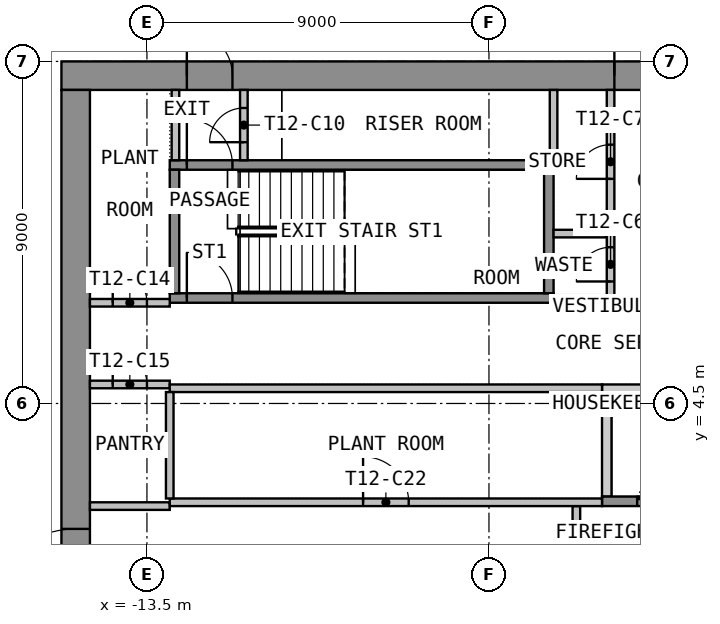
"""IFC4 building model, lengths in metres.
Left out: names, types, materials, properties, quantities, classifications, styles, units other than length and angle.
Written with IfcOpenShell. Run it as: python <this file> out.ifc"""

import sys

from ifc_helpers import new_model, si_unit, direction, frame, frame_2d, origin, place, context, subcontext, project, spatial, polyline, rectangle, outline, extrude, element, fill, save


model = new_model("IFC4")
c1 = context("Model", 3, precision=1e-05, world=origin(), true_north=direction((0.0, 1.0)))
c2 = subcontext(c1, "Body", "Model", "MODEL_VIEW")
j1 = project(units=[si_unit("LENGTHUNIT", "METRE"), si_unit("PLANEANGLEUNIT", "RADIAN")], contexts=[c1])
p1 = place(None, origin())
s1 = spatial("IfcSite", under=j1, at=p1, CompositionType="ELEMENT")
p2 = place(p1, origin())
s2 = spatial("IfcBuilding", under=s1, at=p2, CompositionType="ELEMENT")
p3 = place(p2, frame((0.0, 0.0, 167.7)))
s3 = spatial("IfcBuildingStorey", under=s2, at=p3, CompositionType="ELEMENT", Elevation=167.7)
p4 = place(p3, frame((-15.75, 13.125, 0.0), z_axis=(0.0, 0.0, 1.0), x_axis=(1.0, 0.0, 0.0)))
e1 = element("IfcWall", 1, at=p4, inside=s3, PredefinedType="SHEAR", context=c2, shape_type="SweptSolid", body=[
    extrude(rectangle(XDim=31.5, YDim=0.75, at=frame_2d((15.75, 0.0))), origin(), (0.0, 0.0, 1.0), 3.575),
])
p5 = place(p4, frame((14.55, 0.0, 0.0)))
e2 = element("IfcOpeningElement", 2, at=p5, cuts=e1, PredefinedType="OPENING", context=c2, shape_type="SweptSolid", body=[
    extrude(rectangle(XDim=2.4, YDim=2.1, at=frame_2d((1.2, 1.05))), frame((0.0, 0.385, 0.0), z_axis=(0.0, -1.0, 0.0), x_axis=(1.0, 0.0, 0.0)), (0.0, 0.0, 1.0), 0.77),
])
p6 = place(p4, frame((3.3, 0.0, 0.0)))
e3 = element("IfcOpeningElement", 3, at=p6, cuts=e1, PredefinedType="OPENING", context=c2, shape_type="SweptSolid", body=[
    extrude(rectangle(XDim=1.2, YDim=2.1, at=frame_2d((0.6, 1.05))), frame((0.0, 0.385, 0.0), z_axis=(0.0, -1.0, 0.0), x_axis=(1.0, 0.0, 0.0)), (0.0, 0.0, 1.0), 0.77),
])
p7 = place(p4, frame((27.0, 0.0, 0.0)))
e4 = element("IfcOpeningElement", 4, at=p7, cuts=e1, PredefinedType="OPENING", context=c2, shape_type="SweptSolid", body=[
    extrude(rectangle(XDim=1.2, YDim=2.1, at=frame_2d((0.6, 1.05))), frame((0.0, 0.385, 0.0), z_axis=(0.0, -1.0, 0.0), x_axis=(1.0, 0.0, 0.0)), (0.0, 0.0, 1.0), 0.77),
])
p8 = place(p3, frame((-15.375, -12.75, 0.0), z_axis=(0.0, 0.0, 1.0), x_axis=(0.0, 1.0, 0.0)))
e5 = element("IfcWall", 5, at=p8, inside=s3, PredefinedType="SHEAR", context=c2, shape_type="SweptSolid", body=[
    extrude(rectangle(XDim=25.5, YDim=0.75, at=frame_2d((12.75, 0.0))), origin(), (0.0, 0.0, 1.0), 3.575),
])
p9 = place(p8, frame((11.55, 0.0, 0.0)))
e6 = element("IfcOpeningElement", 6, at=p9, cuts=e5, PredefinedType="OPENING", context=c2, shape_type="SweptSolid", body=[
    extrude(rectangle(XDim=2.4, YDim=2.1, at=frame_2d((1.2, 1.05))), frame((0.0, 0.385, 0.0), z_axis=(0.0, -1.0, 0.0), x_axis=(1.0, 0.0, 0.0)), (0.0, 0.0, 1.0), 0.77),
])
p10 = place(p3, origin())
e7 = element("IfcWall", 7, at=p10, inside=s3, PredefinedType="SHEAR", context=c2, shape_type="SweptSolid", body=[
    extrude(outline(polyline([(-1.525, 4.75), (1.525, 4.75), (1.525, 5.0), (-1.525, 5.0), (-1.525, 4.75)])), origin(), (0.0, 0.0, 1.0), 3.575),
])
p11 = place(p3, origin())
e8 = element("IfcWall", 8, at=p11, inside=s3, PredefinedType="SHEAR", context=c2, shape_type="SweptSolid", body=[
    extrude(outline(polyline([(-1.525, 2.05), (-1.275, 2.05), (-1.275, 4.75), (-1.525, 4.75), (-1.525, 2.05)])), origin(), (0.0, 0.0, 1.0), 3.575),
])
p12 = place(p3, frame((-1.525, 1.925, 0.0), z_axis=(0.0, 0.0, 1.0), x_axis=(1.0, 0.0, 0.0)))
e9 = element("IfcWall", 9, at=p12, inside=s3, PredefinedType="SHEAR", context=c2, shape_type="SweptSolid", body=[
    extrude(rectangle(XDim=3.05, YDim=0.25, at=frame_2d((1.525, 0.0))), origin(), (0.0, 0.0, 1.0), 3.575),
])
p13 = place(p12, frame((0.925, 0.0, 0.0)))
e10 = element("IfcOpeningElement", 10, at=p13, cuts=e9, PredefinedType="OPENING", context=c2, shape_type="SweptSolid", body=[
    extrude(rectangle(XDim=1.2, YDim=2.1, at=frame_2d((0.6, 1.05))), frame((0.0, 0.135, 0.0), z_axis=(0.0, -1.0, 0.0), x_axis=(1.0, 0.0, 0.0)), (0.0, 0.0, 1.0), 0.27),
])
p14 = place(p3, frame((-2.2, -1.8, 0.0), z_axis=(0.0, 0.0, 1.0), x_axis=(0.0, 1.0, 0.0)))
e11 = element("IfcWall", 11, at=p14, inside=s3, PredefinedType="PARTITIONING", context=c2, shape_type="SweptSolid", body=[
    extrude(rectangle(XDim=3.6, YDim=0.2, at=frame_2d((1.8, 0.0))), origin(), (0.0, 0.0, 1.0), 3.575),
])
p15 = place(p14, frame((1.2, 0.0, 0.0)))
e12 = element("IfcOpeningElement", 12, at=p15, cuts=e11, PredefinedType="OPENING", context=c2, shape_type="SweptSolid", body=[
    extrude(rectangle(XDim=1.2, YDim=2.1, at=frame_2d((0.6, 1.05))), frame((0.0, 0.11, 0.0), z_axis=(0.0, -1.0, 0.0), x_axis=(1.0, 0.0, 0.0)), (0.0, 0.0, 1.0), 0.22),
])
p16 = place(p3, frame((-12.9, 7.275, 0.0), z_axis=(0.0, 0.0, 1.0), x_axis=(1.0, 0.0, 0.0)))
e13 = element("IfcWall", 13, at=p16, inside=s3, PredefinedType="SHEAR", context=c2, shape_type="SweptSolid", body=[
    extrude(rectangle(XDim=10.1, YDim=0.25, at=frame_2d((5.05, 0.0))), origin(), (0.0, 0.0, 1.0), 3.575),
])
p17 = place(p16, frame((0.45, 0.0, 0.0)))
e14 = element("IfcOpeningElement", 14, at=p17, cuts=e13, PredefinedType="OPENING", context=c2, shape_type="SweptSolid", body=[
    extrude(rectangle(XDim=1.2, YDim=2.1, at=frame_2d((0.6, 1.05))), frame((0.0, 0.135, 0.0), z_axis=(0.0, -1.0, 0.0), x_axis=(1.0, 0.0, 0.0)), (0.0, 0.0, 1.0), 0.27),
])
p18 = place(p3, frame((-12.9, 10.775, 0.0), z_axis=(0.0, 0.0, 1.0), x_axis=(1.0, 0.0, 0.0)))
e15 = element("IfcWall", 15, at=p18, inside=s3, PredefinedType="SHEAR", context=c2, shape_type="SweptSolid", body=[
    extrude(rectangle(XDim=10.1, YDim=0.25, at=frame_2d((5.05, 0.0))), origin(), (0.0, 0.0, 1.0), 3.575),
])
p19 = place(p18, frame((0.45, 0.0, 0.0)))
e16 = element("IfcOpeningElement", 16, at=p19, cuts=e15, PredefinedType="OPENING", context=c2, shape_type="SweptSolid", body=[
    extrude(rectangle(XDim=1.2, YDim=2.1, at=frame_2d((0.6, 1.05))), frame((0.0, 0.135, 0.0), z_axis=(0.0, -1.0, 0.0), x_axis=(1.0, 0.0, 0.0)), (0.0, 0.0, 1.0), 0.27),
])
for number, where, z_axis, x_axis in (
    (17, (-12.775, 7.4, 0.0), (0.0, 0.0, 1.0), (0.0, 1.0, 0.0)),
    (18, (-2.925, 7.4, 0.0), (0.0, 0.0, 1.0), (0.0, 1.0, 0.0)),
):
    element("IfcWall", number, at=place(p3, frame(where, z_axis=z_axis, x_axis=x_axis)), inside=s3, PredefinedType="SHEAR", context=c2, shape_type="SweptSolid", body=[
        extrude(rectangle(XDim=3.25, YDim=0.25, at=frame_2d((1.625, 0.0))), origin(), (0.0, 0.0, 1.0), 3.575),
    ])
for number, where, z_axis, x_axis in (
    (19, (-2.8, 7.25, 0.0), (0.0, 0.0, 1.0), (1.0, 0.0, 0.0)),
    (20, (-2.8, 8.97, 0.0), (0.0, 0.0, 1.0), (1.0, 0.0, 0.0)),
):
    element("IfcWall", number, at=place(p3, frame(where, z_axis=z_axis, x_axis=x_axis)), inside=s3, PredefinedType="PARTITIONING", context=c2, shape_type="SweptSolid", body=[
        extrude(rectangle(XDim=1.4, YDim=0.2, at=frame_2d((0.7, 0.0))), origin(), (0.0, 0.0, 1.0), 3.575),
    ])
p20 = place(p3, frame((-1.3, 7.15, 0.0), z_axis=(0.0, 0.0, 1.0), x_axis=(0.0, 1.0, 0.0)))
e21 = element("IfcWall", 21, at=p20, inside=s3, PredefinedType="PARTITIONING", context=c2, shape_type="SweptSolid", body=[
    extrude(rectangle(XDim=5.6, YDim=0.2, at=frame_2d((2.8, 0.0))), origin(), (0.0, 0.0, 1.0), 3.575),
])
p21 = place(p20, frame((0.56, 0.0, 0.0)))
e22 = element("IfcOpeningElement", 22, at=p21, cuts=e21, PredefinedType="OPENING", context=c2, shape_type="SweptSolid", body=[
    extrude(rectangle(XDim=0.9, YDim=2.1, at=frame_2d((0.45, 1.05))), frame((0.0, 0.11, 0.0), z_axis=(0.0, -1.0, 0.0), x_axis=(1.0, 0.0, 0.0)), (0.0, 0.0, 1.0), 0.22),
])
p22 = place(p20, frame((3.26, 0.0, 0.0)))
e23 = element("IfcOpeningElement", 23, at=p22, cuts=e21, PredefinedType="OPENING", context=c2, shape_type="SweptSolid", body=[
    extrude(rectangle(XDim=0.9, YDim=2.1, at=frame_2d((0.45, 1.05))), frame((0.0, 0.11, 0.0), z_axis=(0.0, -1.0, 0.0), x_axis=(1.0, 0.0, 0.0)), (0.0, 0.0, 1.0), 0.22),
])
p23 = place(p3, frame((-12.75, 10.9, 0.0), z_axis=(0.0, 0.0, 1.0), x_axis=(0.0, 1.0, 0.0)))
e24 = element("IfcWall", 24, at=p23, inside=s3, PredefinedType="PARTITIONING", context=c2, shape_type="SweptSolid", body=[
    extrude(rectangle(XDim=1.85, YDim=0.2, at=frame_2d((0.925, 0.0))), origin(), (0.0, 0.0, 1.0), 3.575),
])
p24 = place(p3, frame((-10.95, 10.9, 0.0), z_axis=(0.0, 0.0, 1.0), x_axis=(0.0, 1.0, 0.0)))
e25 = element("IfcWall", 25, at=p24, inside=s3, PredefinedType="PARTITIONING", context=c2, shape_type="SweptSolid", body=[
    extrude(rectangle(XDim=1.85, YDim=0.2, at=frame_2d((0.925, 0.0))), origin(), (0.0, 0.0, 1.0), 3.575),
])
p25 = place(p24, frame((0.475, 0.0, 0.0)))
e26 = element("IfcOpeningElement", 26, at=p25, cuts=e25, PredefinedType="OPENING", context=c2, shape_type="SweptSolid", body=[
    extrude(rectangle(XDim=0.9, YDim=2.1, at=frame_2d((0.45, 1.05))), frame((0.0, 0.11, 0.0), z_axis=(0.0, -1.0, 0.0), x_axis=(1.0, 0.0, 0.0)), (0.0, 0.0, 1.0), 0.22),
])
p26 = place(p3, frame((-15.0, 7.15, 0.0), z_axis=(0.0, 0.0, 1.0), x_axis=(1.0, 0.0, 0.0)))
e27 = element("IfcWall", 27, at=p26, inside=s3, PredefinedType="PARTITIONING", context=c2, shape_type="SweptSolid", body=[
    extrude(rectangle(XDim=2.1, YDim=0.2, at=frame_2d((1.05, 0.0))), origin(), (0.0, 0.0, 1.0), 3.575),
])
p27 = place(p26, frame((0.6, 0.0, 0.0)))
e28 = element("IfcOpeningElement", 28, at=p27, cuts=e27, PredefinedType="OPENING", context=c2, shape_type="SweptSolid", body=[
    extrude(rectangle(XDim=0.9, YDim=2.1, at=frame_2d((0.45, 1.05))), frame((0.0, 0.11, 0.0), z_axis=(0.0, -1.0, 0.0), x_axis=(1.0, 0.0, 0.0)), (0.0, 0.0, 1.0), 0.22),
])
p28 = place(p3, frame((-15.0, 5.0, 0.0), z_axis=(0.0, 0.0, 1.0), x_axis=(1.0, 0.0, 0.0)))
e29 = element("IfcWall", 29, at=p28, inside=s3, PredefinedType="PARTITIONING", context=c2, shape_type="SweptSolid", body=[
    extrude(rectangle(XDim=2.1, YDim=0.2, at=frame_2d((1.05, 0.0))), origin(), (0.0, 0.0, 1.0), 3.575),
])
p29 = place(p28, frame((0.6, 0.0, 0.0)))
e30 = element("IfcOpeningElement", 30, at=p29, cuts=e29, PredefinedType="OPENING", context=c2, shape_type="SweptSolid", body=[
    extrude(rectangle(XDim=0.9, YDim=2.1, at=frame_2d((0.45, 1.05))), frame((0.0, 0.11, 0.0), z_axis=(0.0, -1.0, 0.0), x_axis=(1.0, 0.0, 0.0)), (0.0, 0.0, 1.0), 0.22),
])
p30 = place(p3, frame((-15.0, 1.8, 0.0), z_axis=(0.0, 0.0, 1.0), x_axis=(1.0, 0.0, 0.0)))
e31 = element("IfcWall", 31, at=p30, inside=s3, PredefinedType="PARTITIONING", context=c2, shape_type="SweptSolid", body=[
    extrude(rectangle(XDim=2.1, YDim=0.2, at=frame_2d((1.05, 0.0))), origin(), (0.0, 0.0, 1.0), 3.575),
])
p31 = place(p3, frame((-12.9, 1.9, 0.0), z_axis=(0.0, 0.0, 1.0), x_axis=(1.0, 0.0, 0.0)))
e32 = element("IfcWall", 32, at=p31, inside=s3, PredefinedType="PARTITIONING", context=c2, shape_type="SweptSolid", body=[
    extrude(rectangle(XDim=11.375, YDim=0.2, at=frame_2d((5.688, 0.0))), origin(), (0.0, 0.0, 1.0), 3.575),
])
p32 = place(p31, frame((5.087, 0.0, 0.0)))
e33 = element("IfcOpeningElement", 33, at=p32, cuts=e32, PredefinedType="OPENING", context=c2, shape_type="SweptSolid", body=[
    extrude(rectangle(XDim=1.2, YDim=2.1, at=frame_2d((0.6, 1.05))), frame((0.0, 0.11, 0.0), z_axis=(0.0, -1.0, 0.0), x_axis=(1.0, 0.0, 0.0)), (0.0, 0.0, 1.0), 0.22),
])
p33 = place(p3, frame((-12.9, 4.9, 0.0), z_axis=(0.0, 0.0, 1.0), x_axis=(1.0, 0.0, 0.0)))
e34 = element("IfcWall", 34, at=p33, inside=s3, PredefinedType="PARTITIONING", context=c2, shape_type="SweptSolid", body=[
    extrude(rectangle(XDim=11.375, YDim=0.2, at=frame_2d((5.688, 0.0))), origin(), (0.0, 0.0, 1.0), 3.575),
])
p34 = place(p3, frame((-12.9, 2.0, 0.0), z_axis=(0.0, 0.0, 1.0), x_axis=(0.0, 1.0, 0.0)))
e35 = element("IfcWall", 35, at=p34, inside=s3, PredefinedType="PARTITIONING", context=c2, shape_type="SweptSolid", body=[
    extrude(rectangle(XDim=2.8, YDim=0.2, at=frame_2d((1.4, 0.0))), origin(), (0.0, 0.0, 1.0), 3.575),
])
p35 = place(p3, frame((-2.8, 10.901, 0.0), z_axis=(0.0, 0.0, 1.0), x_axis=(0.0, 1.0, 0.0)))
e36 = element("IfcWall", 36, at=p35, inside=s3, PredefinedType="PARTITIONING", context=c2, shape_type="SweptSolid", body=[
    extrude(rectangle(XDim=1.848, YDim=0.2, at=frame_2d((0.924, 0.0))), origin(), (0.0, 0.0, 1.0), 3.575),
])
p36 = place(p9, origin())
e37 = element("IfcDoor", 37, at=p36, inside=s3, OperationType="DOUBLE_DOOR_DOUBLE_SWING", PredefinedType="DOOR", context=c2, shape_type="SweptSolid", body=[
    extrude(rectangle(XDim=2.4, YDim=2.1, at=frame_2d((1.2, 1.05))), frame((0.0, 0.025, 0.0), z_axis=(0.0, -1.0, 0.0), x_axis=(1.0, 0.0, 0.0)), (0.0, 0.0, 1.0), 0.05),
])
fill(e6, e37)
p37 = place(p5, origin())
e38 = element("IfcDoor", 38, at=p37, inside=s3, OperationType="DOUBLE_DOOR_DOUBLE_SWING", PredefinedType="DOOR", context=c2, shape_type="SweptSolid", body=[
    extrude(rectangle(XDim=2.4, YDim=2.1, at=frame_2d((1.2, 1.05))), frame((0.0, 0.025, 0.0), z_axis=(0.0, -1.0, 0.0), x_axis=(1.0, 0.0, 0.0)), (0.0, 0.0, 1.0), 0.05),
])
fill(e2, e38)
p38 = place(p6, origin())
e39 = element("IfcDoor", 39, at=p38, inside=s3, OperationType="SINGLE_SWING_RIGHT", PredefinedType="DOOR", context=c2, shape_type="SweptSolid", body=[
    extrude(rectangle(XDim=1.2, YDim=2.1, at=frame_2d((0.6, 1.05))), frame((0.0, 0.025, 0.0), z_axis=(0.0, -1.0, 0.0), x_axis=(1.0, 0.0, 0.0)), (0.0, 0.0, 1.0), 0.05),
])
fill(e3, e39)
p39 = place(p13, origin())
e40 = element("IfcDoor", 40, at=p39, inside=s3, OperationType="DOUBLE_DOOR_SLIDING", PredefinedType="DOOR", context=c2, shape_type="SweptSolid", body=[
    extrude(rectangle(XDim=1.2, YDim=2.1, at=frame_2d((0.6, 1.05))), frame((0.0, 0.025, 0.0), z_axis=(0.0, -1.0, 0.0), x_axis=(1.0, 0.0, 0.0)), (0.0, 0.0, 1.0), 0.05),
])
fill(e10, e40)
p40 = place(p17, origin())
e41 = element("IfcDoor", 41, at=p40, inside=s3, OperationType="SINGLE_SWING_LEFT", PredefinedType="DOOR", context=c2, shape_type="SweptSolid", body=[
    extrude(rectangle(XDim=1.2, YDim=2.1, at=frame_2d((0.6, 1.05))), frame((0.0, 0.025, 0.0), z_axis=(0.0, -1.0, 0.0), x_axis=(1.0, 0.0, 0.0)), (0.0, 0.0, 1.0), 0.05),
])
fill(e14, e41)
p41 = place(p21, origin())
e42 = element("IfcDoor", 42, at=p41, inside=s3, OperationType="SINGLE_SWING_LEFT", PredefinedType="DOOR", context=c2, shape_type="SweptSolid", body=[
    extrude(rectangle(XDim=0.9, YDim=2.1, at=frame_2d((0.45, 1.05))), frame((0.0, 0.025, 0.0), z_axis=(0.0, -1.0, 0.0), x_axis=(1.0, 0.0, 0.0)), (0.0, 0.0, 1.0), 0.05),
])
fill(e22, e42)
p42 = place(p22, origin())
e43 = element("IfcDoor", 43, at=p42, inside=s3, OperationType="SINGLE_SWING_LEFT", PredefinedType="DOOR", context=c2, shape_type="SweptSolid", body=[
    extrude(rectangle(XDim=0.9, YDim=2.1, at=frame_2d((0.45, 1.05))), frame((0.0, 0.025, 0.0), z_axis=(0.0, -1.0, 0.0), x_axis=(1.0, 0.0, 0.0)), (0.0, 0.0, 1.0), 0.05),
])
fill(e23, e43)
p43 = place(p19, origin())
e44 = element("IfcDoor", 44, at=p43, inside=s3, OperationType="SINGLE_SWING_RIGHT", PredefinedType="DOOR", context=c2, shape_type="SweptSolid", body=[
    extrude(rectangle(XDim=1.2, YDim=2.1, at=frame_2d((0.6, 1.05))), frame((0.0, 0.025, 0.0), z_axis=(0.0, -1.0, 0.0), x_axis=(1.0, 0.0, 0.0)), (0.0, 0.0, 1.0), 0.05),
])
fill(e16, e44)
p44 = place(p25, origin())
e45 = element("IfcDoor", 45, at=p44, inside=s3, OperationType="SINGLE_SWING_LEFT", PredefinedType="DOOR", context=c2, shape_type="SweptSolid", body=[
    extrude(rectangle(XDim=0.9, YDim=2.1, at=frame_2d((0.45, 1.05))), frame((0.0, 0.025, 0.0), z_axis=(0.0, -1.0, 0.0), x_axis=(1.0, 0.0, 0.0)), (0.0, 0.0, 1.0), 0.05),
])
fill(e26, e45)
p45 = place(p27, origin())
e46 = element("IfcDoor", 46, at=p45, inside=s3, OperationType="SINGLE_SWING_LEFT", PredefinedType="DOOR", context=c2, shape_type="SweptSolid", body=[
    extrude(rectangle(XDim=0.9, YDim=2.1, at=frame_2d((0.45, 1.05))), frame((0.0, 0.025, 0.0), z_axis=(0.0, -1.0, 0.0), x_axis=(1.0, 0.0, 0.0)), (0.0, 0.0, 1.0), 0.05),
])
fill(e28, e46)
p46 = place(p29, origin())
e47 = element("IfcDoor", 47, at=p46, inside=s3, OperationType="SINGLE_SWING_LEFT", PredefinedType="DOOR", context=c2, shape_type="SweptSolid", body=[
    extrude(rectangle(XDim=0.9, YDim=2.1, at=frame_2d((0.45, 1.05))), frame((0.0, 0.025, 0.0), z_axis=(0.0, -1.0, 0.0), x_axis=(1.0, 0.0, 0.0)), (0.0, 0.0, 1.0), 0.05),
])
fill(e30, e47)
p47 = place(p32, origin())
e48 = element("IfcDoor", 48, at=p47, inside=s3, OperationType="SINGLE_SWING_RIGHT", PredefinedType="DOOR", context=c2, shape_type="SweptSolid", body=[
    extrude(rectangle(XDim=1.2, YDim=2.1, at=frame_2d((0.6, 1.05))), frame((0.0, 0.025, 0.0), z_axis=(0.0, -1.0, 0.0), x_axis=(1.0, 0.0, 0.0)), (0.0, 0.0, 1.0), 0.05),
])
fill(e33, e48)
save(model, sys.argv[1])
